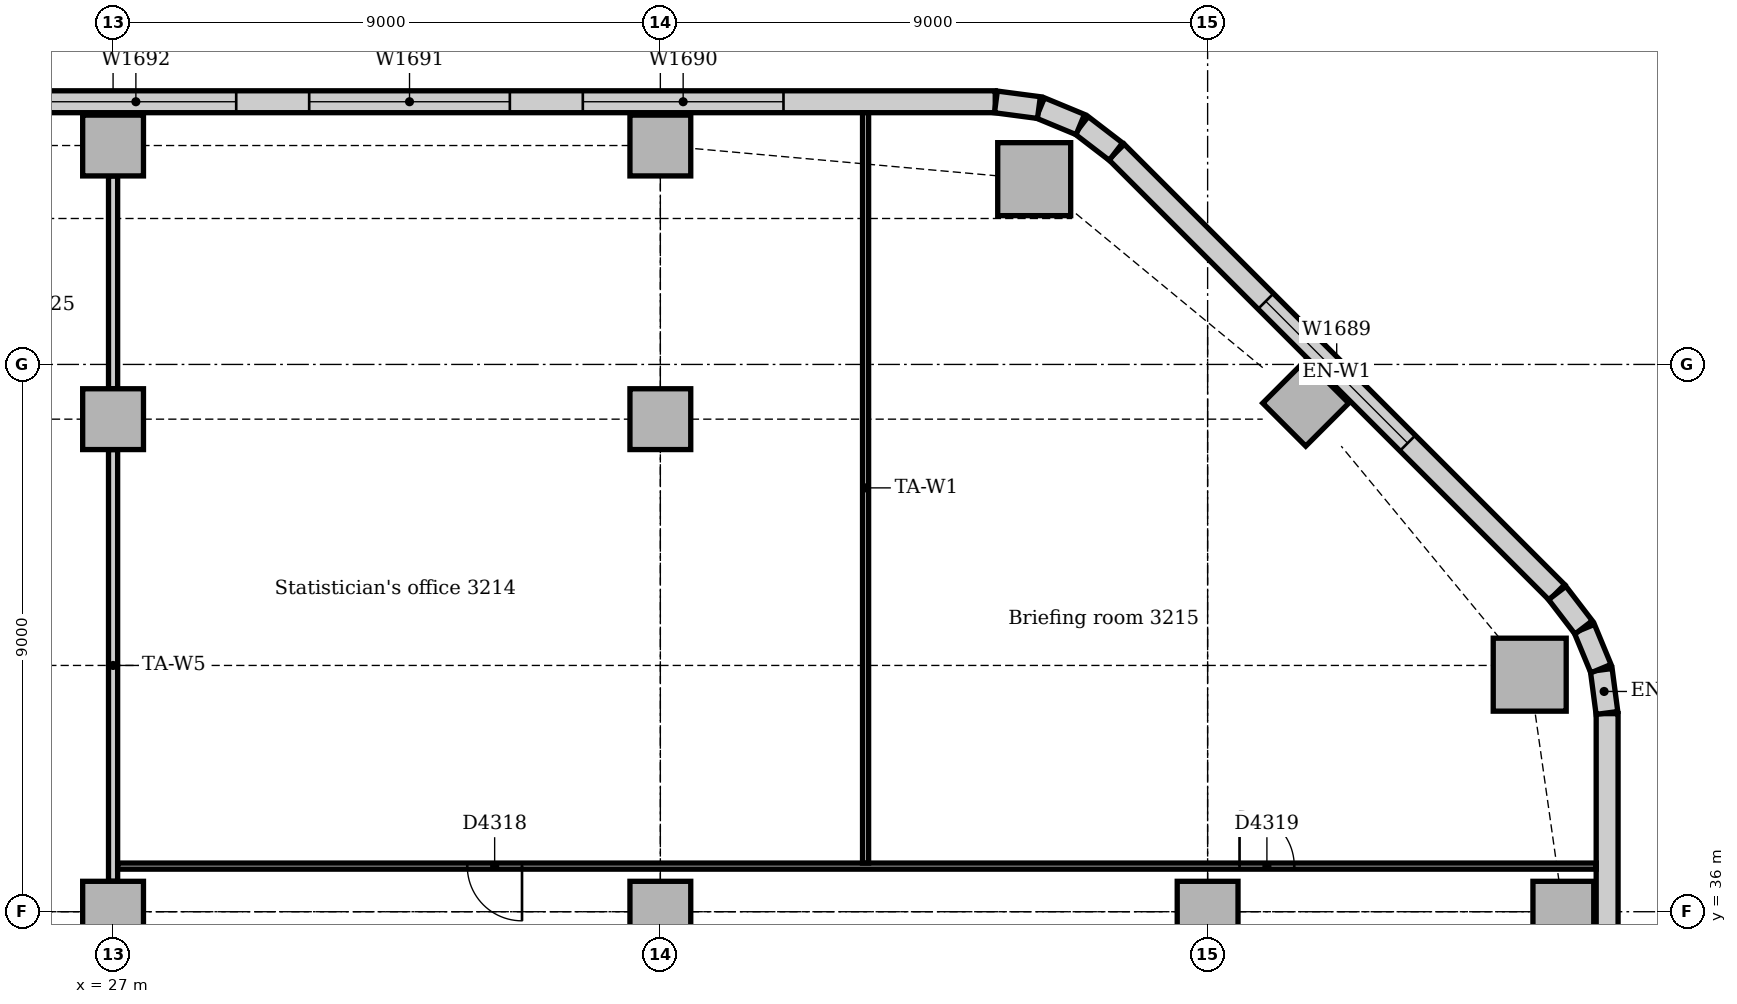
"""IFC4 building model, lengths in metres.
Left out: names, types, materials, properties, quantities, classifications, styles, units other than length and angle.
Written with IfcOpenShell. Run it as: python <this file> out.ifc"""

import sys

from ifc_helpers import new_model, si_unit, direction, frame, frame_2d, origin, origin_2d, place, context, subcontext, project, spatial, rectangle, extrude, element, fill, save


model = new_model("IFC4")
c1 = context("Model", 3, precision=1e-05, world=origin(), true_north=direction((0.0, 1.0)))
c2 = subcontext(c1, "Body", "Model", "MODEL_VIEW")
j1 = project(units=[si_unit("LENGTHUNIT", "METRE"), si_unit("PLANEANGLEUNIT", "RADIAN")], contexts=[c1])
p1 = place(None, origin())
s1 = spatial("IfcSite", under=j1, at=p1, CompositionType="ELEMENT")
p2 = place(p1, origin())
s2 = spatial("IfcBuilding", under=s1, at=p2, CompositionType="ELEMENT")
p3 = place(p2, frame((0.0, 0.0, 136.0)))
s3 = spatial("IfcBuildingStorey", under=s2, at=p3, CompositionType="ELEMENT", Elevation=136.0)
for number, where, z_axis, x_axis in (
    (1, (50.297, 39.898, 0.0), (0.0, 0.0, 1.0), (1.0, 0.0, 0.0)),
    (2, (42.148, 48.047, 0.0), (0.0, 0.0, 1.0), (1.0, 0.0, 0.0)),
):
    element("IfcColumn", number, at=place(p3, frame(where, z_axis=z_axis, x_axis=x_axis)), inside=s3, PredefinedType="COLUMN", context=c2, shape_type="SweptSolid", body=[
        extrude(rectangle(XDim=1.2, YDim=1.2, at=origin_2d()), origin(), (0.0, 0.0, 1.0), 3.85),
    ])
for number, where, z_axis, x_axis in (
    (3, (50.85, 36.0, 0.0), (0.0, 0.0, 1.0), (1.0, 0.0, 0.0)),
    (4, (46.614, 44.364, 0.0), (0.0, 0.0, 1.0), (0.707, 0.707, 0.0)),
    (5, (27.0, 48.6, 0.0), (0.0, 0.0, 1.0), (1.0, 0.0, 0.0)),
    (6, (36.0, 48.6, 0.0), (0.0, 0.0, 1.0), (1.0, 0.0, 0.0)),
    (7, (27.0, 36.0, 0.0), (0.0, 0.0, 1.0), (1.0, 0.0, 0.0)),
    (8, (27.0, 44.1, 0.0), (0.0, 0.0, 1.0), (1.0, 0.0, 0.0)),
    (9, (36.0, 36.0, 0.0), (0.0, 0.0, 1.0), (1.0, 0.0, 0.0)),
    (10, (36.0, 44.1, 0.0), (0.0, 0.0, 1.0), (1.0, 0.0, 0.0)),
    (11, (45.0, 36.0, 0.0), (0.0, 0.0, 1.0), (1.0, 0.0, 0.0)),
):
    element("IfcColumn", number, at=place(p3, frame(where, z_axis=z_axis, x_axis=x_axis)), inside=s3, PredefinedType="COLUMN", context=c2, shape_type="SweptSolid", body=[
        extrude(rectangle(XDim=1.0, YDim=1.0, at=origin_2d()), origin(), (0.0, 0.0, 1.0), 3.85),
    ])
p4 = place(p3, frame((51.57, 14.743, 0.0), z_axis=(0.0, 0.0, 1.0), x_axis=(0.0, 1.0, 0.0)))
e12 = element("IfcWall", 12, at=p4, inside=s3, PredefinedType="STANDARD", context=c2, shape_type="SweptSolid", body=[
    extrude(rectangle(XDim=24.515, YDim=0.36, at=frame_2d((12.257, 0.0))), origin(), (0.0, 0.0, 1.0), 3.85),
])
p5 = place(p4, frame((4.257, 0.0, 0.9)))
e13 = element("IfcOpeningElement", 13, at=p5, cuts=e12, PredefinedType="OPENING", context=c2, shape_type="SweptSolid", body=[
    extrude(rectangle(XDim=1.8, YDim=1.6, at=frame_2d((0.9, 0.8))), frame((0.0, 0.19, 0.0), z_axis=(0.0, -1.0, 0.0), x_axis=(1.0, 0.0, 0.0)), (0.0, 0.0, 1.0), 0.38),
])
p6 = place(p4, frame((8.357, 0.0, 0.9)))
e14 = element("IfcOpeningElement", 14, at=p6, cuts=e12, PredefinedType="OPENING", context=c2, shape_type="SweptSolid", body=[
    extrude(rectangle(XDim=3.3, YDim=1.6, at=frame_2d((1.65, 0.8))), frame((0.0, 0.19, 0.0), z_axis=(0.0, -1.0, 0.0), x_axis=(1.0, 0.0, 0.0)), (0.0, 0.0, 1.0), 0.38),
])
p7 = place(p4, frame((12.857, 0.0, 0.9)))
e15 = element("IfcOpeningElement", 15, at=p7, cuts=e12, PredefinedType="OPENING", context=c2, shape_type="SweptSolid", body=[
    extrude(rectangle(XDim=3.3, YDim=1.6, at=frame_2d((1.65, 0.8))), frame((0.0, 0.19, 0.0), z_axis=(0.0, -1.0, 0.0), x_axis=(1.0, 0.0, 0.0)), (0.0, 0.0, 1.0), 0.38),
])
p8 = place(p4, frame((17.357, 0.0, 0.9)))
e16 = element("IfcOpeningElement", 16, at=p8, cuts=e12, PredefinedType="OPENING", context=c2, shape_type="SweptSolid", body=[
    extrude(rectangle(XDim=3.3, YDim=1.6, at=frame_2d((1.65, 0.8))), frame((0.0, 0.19, 0.0), z_axis=(0.0, -1.0, 0.0), x_axis=(1.0, 0.0, 0.0)), (0.0, 0.0, 1.0), 0.38),
])
p9 = place(p3, frame((50.744, 41.251, 0.0), z_axis=(0.0, 0.0, 1.0), x_axis=(-0.707106781187, 0.707106781187, 0.0)))
e17 = element("IfcWall", 17, at=p9, inside=s3, PredefinedType="STANDARD", context=c2, shape_type="SweptSolid", body=[
    extrude(rectangle(XDim=10.243, YDim=0.36, at=frame_2d((5.121, 0.0))), origin(), (0.0, 0.0, 1.0), 3.85),
])
p10 = place(p9, frame((3.471, 0.0, 0.9)))
e18 = element("IfcOpeningElement", 18, at=p10, cuts=e17, PredefinedType="OPENING", context=c2, shape_type="SweptSolid", body=[
    extrude(rectangle(XDim=3.3, YDim=1.6, at=frame_2d((1.65, 0.8))), frame((0.0, 0.19, 0.0), z_axis=(0.0, -1.0, 0.0), x_axis=(1.0, 0.0, 0.0)), (0.0, 0.0, 1.0), 0.38),
])
p11 = place(p3, frame((41.507, 49.32, 0.0), z_axis=(0.0, 0.0, 1.0), x_axis=(-1.0, 0.0, 0.0)))
e19 = element("IfcWall", 19, at=p11, inside=s3, PredefinedType="STANDARD", context=c2, shape_type="SweptSolid", body=[
    extrude(rectangle(XDim=37.265, YDim=0.36, at=frame_2d((18.632, 0.0))), origin(), (0.0, 0.0, 1.0), 3.85),
])
p12 = place(p11, frame((3.482, 0.0, 0.9)))
e20 = element("IfcOpeningElement", 20, at=p12, cuts=e19, PredefinedType="OPENING", context=c2, shape_type="SweptSolid", body=[
    extrude(rectangle(XDim=3.3, YDim=1.6, at=frame_2d((1.65, 0.8))), frame((0.0, 0.19, 0.0), z_axis=(0.0, -1.0, 0.0), x_axis=(1.0, 0.0, 0.0)), (0.0, 0.0, 1.0), 0.38),
])
p13 = place(p11, frame((7.982, 0.0, 0.9)))
e21 = element("IfcOpeningElement", 21, at=p13, cuts=e19, PredefinedType="OPENING", context=c2, shape_type="SweptSolid", body=[
    extrude(rectangle(XDim=3.3, YDim=1.6, at=frame_2d((1.65, 0.8))), frame((0.0, 0.19, 0.0), z_axis=(0.0, -1.0, 0.0), x_axis=(1.0, 0.0, 0.0)), (0.0, 0.0, 1.0), 0.38),
])
p14 = place(p11, frame((12.482, 0.0, 0.9)))
e22 = element("IfcOpeningElement", 22, at=p14, cuts=e19, PredefinedType="OPENING", context=c2, shape_type="SweptSolid", body=[
    extrude(rectangle(XDim=3.3, YDim=1.6, at=frame_2d((1.65, 0.8))), frame((0.0, 0.19, 0.0), z_axis=(0.0, -1.0, 0.0), x_axis=(1.0, 0.0, 0.0)), (0.0, 0.0, 1.0), 0.38),
])
p15 = place(p11, frame((17.032, 0.0, 0.9)))
e23 = element("IfcOpeningElement", 23, at=p15, cuts=e19, PredefinedType="OPENING", context=c2, shape_type="SweptSolid", body=[
    extrude(rectangle(XDim=1.8, YDim=1.6, at=frame_2d((0.9, 0.8))), frame((0.0, 0.19, 0.0), z_axis=(0.0, -1.0, 0.0), x_axis=(1.0, 0.0, 0.0)), (0.0, 0.0, 1.0), 0.38),
])
p16 = place(p11, frame((22.232, 0.0, 0.9)))
e24 = element("IfcOpeningElement", 24, at=p16, cuts=e19, PredefinedType="OPENING", context=c2, shape_type="SweptSolid", body=[
    extrude(rectangle(XDim=1.8, YDim=1.6, at=frame_2d((0.9, 0.8))), frame((0.0, 0.19, 0.0), z_axis=(0.0, -1.0, 0.0), x_axis=(1.0, 0.0, 0.0)), (0.0, 0.0, 1.0), 0.38),
])
p17 = place(p11, frame((25.982, 0.0, 0.9)))
e25 = element("IfcOpeningElement", 25, at=p17, cuts=e19, PredefinedType="OPENING", context=c2, shape_type="SweptSolid", body=[
    extrude(rectangle(XDim=3.3, YDim=1.6, at=frame_2d((1.65, 0.8))), frame((0.0, 0.19, 0.0), z_axis=(0.0, -1.0, 0.0), x_axis=(1.0, 0.0, 0.0)), (0.0, 0.0, 1.0), 0.38),
])
p18 = place(p11, frame((30.482, 0.0, 0.9)))
e26 = element("IfcOpeningElement", 26, at=p18, cuts=e19, PredefinedType="OPENING", context=c2, shape_type="SweptSolid", body=[
    extrude(rectangle(XDim=3.3, YDim=1.6, at=frame_2d((1.65, 0.8))), frame((0.0, 0.19, 0.0), z_axis=(0.0, -1.0, 0.0), x_axis=(1.0, 0.0, 0.0)), (0.0, 0.0, 1.0), 0.38),
])
for number, where, z_axis, x_axis in (
    (27, (51.567, 39.269, 0.0), (0.0, 0.0, 1.0), (-0.131, 0.991, 0.0)),
    (28, (51.468, 39.997, 0.0), (0.0, 0.0, 1.0), (-0.383, 0.924, 0.0)),
):
    element("IfcWall", number, at=place(p3, frame(where, z_axis=z_axis, x_axis=x_axis)), inside=s3, PredefinedType="STANDARD", context=c2, shape_type="SweptSolid", body=[
        extrude(rectangle(XDim=0.713, YDim=0.36, at=frame_2d((0.356, 0.0))), origin(), (0.0, 0.0, 1.0), 3.85),
    ])
for number, where, z_axis, x_axis in (
    (29, (51.184, 40.675, 0.0), (0.0, 0.0, 1.0), (-0.609, 0.793, 0.0)),
    (30, (43.491, 48.5, 0.0), (0.0, 0.0, 1.0), (-0.793, 0.609, 0.0)),
):
    element("IfcWall", number, at=place(p3, frame(where, z_axis=z_axis, x_axis=x_axis)), inside=s3, PredefinedType="STANDARD", context=c2, shape_type="SweptSolid", body=[
        extrude(rectangle(XDim=0.713, YDim=0.36, at=frame_2d((0.357, 0.0))), origin(), (0.0, 0.0, 1.0), 3.85),
    ])
for number, where, z_axis, x_axis in (
    (31, (42.906, 48.945, 0.0), (0.0, 0.0, 1.0), (-0.924, 0.383, 0.0)),
    (32, (42.226, 49.224, 0.0), (0.0, 0.0, 1.0), (-0.991, 0.131, 0.0)),
):
    element("IfcWall", number, at=place(p3, frame(where, z_axis=z_axis, x_axis=x_axis)), inside=s3, PredefinedType="STANDARD", context=c2, shape_type="SweptSolid", body=[
        extrude(rectangle(XDim=0.713, YDim=0.36, at=frame_2d((0.356, 0.0))), origin(), (0.0, 0.0, 1.0), 3.85),
    ])
p19 = place(p3, frame((27.0, 36.5, 0.0), z_axis=(0.0, 0.0, 1.0), x_axis=(0.0, 1.0, 0.0)))
e33 = element("IfcWall", 33, at=p19, inside=s3, PredefinedType="PARTITIONING", context=c2, shape_type="SweptSolid", body=[
    extrude(rectangle(XDim=7.1, YDim=0.15, at=frame_2d((3.55, 0.0))), origin(), (0.0, 0.0, 1.0), 3.256),
])
p20 = place(p3, frame((27.0, 44.6, 0.0), z_axis=(0.0, 0.0, 1.0), x_axis=(0.0, 1.0, 0.0)))
e34 = element("IfcWall", 34, at=p20, inside=s3, PredefinedType="PARTITIONING", context=c2, shape_type="SweptSolid", body=[
    extrude(rectangle(XDim=3.5, YDim=0.15, at=frame_2d((1.75, 0.0))), origin(), (0.0, 0.0, 1.0), 3.652),
])
p21 = place(p3, frame((27.075, 36.75, 0.0), z_axis=(0.0, 0.0, 1.0), x_axis=(1.0, 0.0, 0.0)))
e35 = element("IfcWall", 35, at=p21, inside=s3, PredefinedType="PARTITIONING", context=c2, shape_type="SweptSolid", body=[
    extrude(rectangle(XDim=24.315, YDim=0.1, at=frame_2d((12.158, 0.0))), origin(), (0.0, 0.0, 1.0), 3.85),
])
p22 = place(p21, frame((5.75, 0.0, 0.0)))
e36 = element("IfcOpeningElement", 36, at=p22, cuts=e35, PredefinedType="OPENING", context=c2, shape_type="SweptSolid", body=[
    extrude(rectangle(XDim=0.9, YDim=2.1, at=frame_2d((0.45, 1.05))), frame((0.0, 0.06, 0.0), z_axis=(0.0, -1.0, 0.0), x_axis=(1.0, 0.0, 0.0)), (0.0, 0.0, 1.0), 0.12),
])
p23 = place(p21, frame((18.45, 0.0, 0.0)))
e37 = element("IfcOpeningElement", 37, at=p23, cuts=e35, PredefinedType="OPENING", context=c2, shape_type="SweptSolid", body=[
    extrude(rectangle(XDim=0.9, YDim=2.1, at=frame_2d((0.45, 1.05))), frame((0.0, 0.06, 0.0), z_axis=(0.0, -1.0, 0.0), x_axis=(1.0, 0.0, 0.0)), (0.0, 0.0, 1.0), 0.12),
])
p24 = place(p3, frame((39.375, 36.8, 0.0), z_axis=(0.0, 0.0, 1.0), x_axis=(0.0, 1.0, 0.0)))
e38 = element("IfcWall", 38, at=p24, inside=s3, PredefinedType="PARTITIONING", context=c2, shape_type="SweptSolid", body=[
    extrude(rectangle(XDim=12.34, YDim=0.1, at=frame_2d((6.17, 0.0))), origin(), (0.0, 0.0, 1.0), 3.85),
])
p25 = place(p10, origin())
e39 = element("IfcWindow", 39, at=p25, inside=s3, PartitioningType="SINGLE_PANEL", PredefinedType="WINDOW", context=c2, shape_type="SweptSolid", body=[
    extrude(rectangle(XDim=3.3, YDim=1.6, at=frame_2d((1.65, 0.8))), frame((0.0, 0.13, 0.0), z_axis=(0.0, -1.0, 0.0), x_axis=(1.0, 0.0, 0.0)), (0.0, 0.0, 1.0), 0.06),
])
fill(e18, e39)
p26 = place(p12, origin())
e40 = element("IfcWindow", 40, at=p26, inside=s3, PartitioningType="SINGLE_PANEL", PredefinedType="WINDOW", context=c2, shape_type="SweptSolid", body=[
    extrude(rectangle(XDim=3.3, YDim=1.6, at=frame_2d((1.65, 0.8))), frame((0.0, 0.13, 0.0), z_axis=(0.0, -1.0, 0.0), x_axis=(1.0, 0.0, 0.0)), (0.0, 0.0, 1.0), 0.06),
])
fill(e20, e40)
p27 = place(p13, origin())
e41 = element("IfcWindow", 41, at=p27, inside=s3, PartitioningType="SINGLE_PANEL", PredefinedType="WINDOW", context=c2, shape_type="SweptSolid", body=[
    extrude(rectangle(XDim=3.3, YDim=1.6, at=frame_2d((1.65, 0.8))), frame((0.0, 0.13, 0.0), z_axis=(0.0, -1.0, 0.0), x_axis=(1.0, 0.0, 0.0)), (0.0, 0.0, 1.0), 0.06),
])
fill(e21, e41)
p28 = place(p14, origin())
e42 = element("IfcWindow", 42, at=p28, inside=s3, PartitioningType="SINGLE_PANEL", PredefinedType="WINDOW", context=c2, shape_type="SweptSolid", body=[
    extrude(rectangle(XDim=3.3, YDim=1.6, at=frame_2d((1.65, 0.8))), frame((0.0, 0.13, 0.0), z_axis=(0.0, -1.0, 0.0), x_axis=(1.0, 0.0, 0.0)), (0.0, 0.0, 1.0), 0.06),
])
fill(e22, e42)
p29 = place(p22, frame((0.9, 0.0, 0.0), z_axis=(0.0, 0.0, 1.0), x_axis=(-1.0, 0.0, 0.0)))
e43 = element("IfcDoor", 43, at=p29, inside=s3, OperationType="SINGLE_SWING_LEFT", PredefinedType="DOOR", context=c2, shape_type="SweptSolid", body=[
    extrude(rectangle(XDim=0.9, YDim=2.1, at=frame_2d((0.45, 1.05))), frame((0.0, 0.025, 0.0), z_axis=(0.0, -1.0, 0.0), x_axis=(1.0, 0.0, 0.0)), (0.0, 0.0, 1.0), 0.05),
])
fill(e36, e43)
p30 = place(p23, origin())
e44 = element("IfcDoor", 44, at=p30, inside=s3, OperationType="SINGLE_SWING_LEFT", PredefinedType="DOOR", context=c2, shape_type="SweptSolid", body=[
    extrude(rectangle(XDim=0.9, YDim=2.1, at=frame_2d((0.45, 1.05))), frame((0.0, 0.025, 0.0), z_axis=(0.0, -1.0, 0.0), x_axis=(1.0, 0.0, 0.0)), (0.0, 0.0, 1.0), 0.05),
])
fill(e37, e44)
save(model, sys.argv[1])
